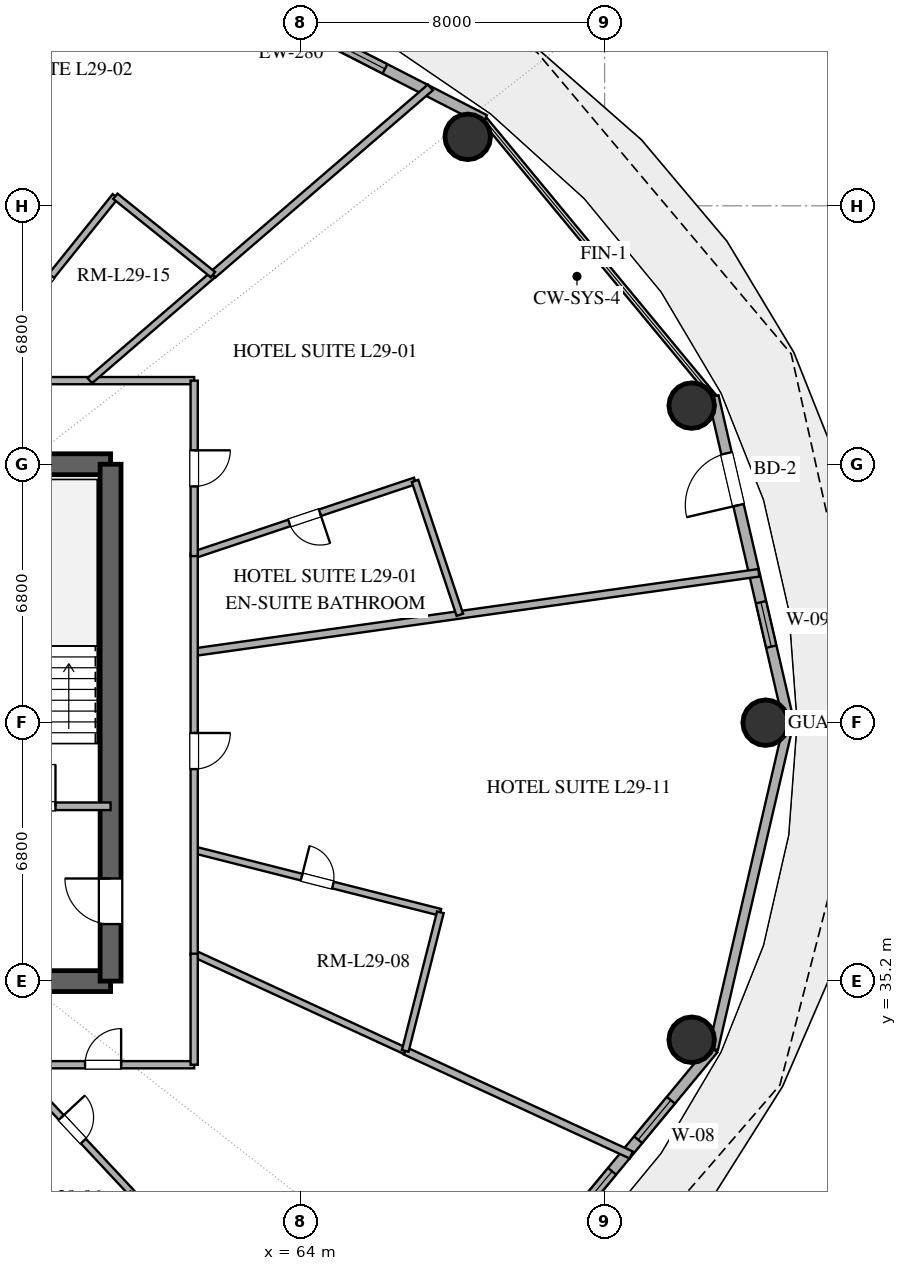
"""IFC4 building model, lengths in metres.
Left out: names, types, materials, properties, quantities, classifications, styles, units other than length and angle.
Written with IfcOpenShell. Run it as: python <this file> out.ifc"""

import sys

from ifc_helpers import new_model, si_unit, direction, frame, frame_2d, origin, origin_2d, place, context, subcontext, project, spatial, rectangle, hollow_circle, extrude, element, fill, save


model = new_model("IFC4")
c1 = context("Model", 3, precision=1e-05, world=origin(), true_north=direction((0.0, 1.0)))
c2 = subcontext(c1, "Body", "Model", "MODEL_VIEW")
j1 = project(units=[si_unit("LENGTHUNIT", "METRE"), si_unit("PLANEANGLEUNIT", "RADIAN")], contexts=[c1])
p1 = place(None, origin())
s1 = spatial("IfcSite", under=j1, at=p1, CompositionType="ELEMENT")
p2 = place(p1, origin())
s2 = spatial("IfcBuilding", under=s1, at=p2, CompositionType="ELEMENT")
p3 = place(p2, frame((0.0, 0.0, 116.4)))
s3 = spatial("IfcBuildingStorey", under=s2, at=p3, CompositionType="ELEMENT", Elevation=116.4)
for number, where, z_axis, x_axis in (
    (1, (55.0, 35.2, 0.0), (0.0, 0.0, 1.0), (1.0, 0.0, 0.0)),
    (2, (55.0, 48.8, 0.0), (0.0, 0.0, 1.0), (1.0, 0.0, 0.0)),
):
    element("IfcWall", number, at=place(p3, frame(where, z_axis=z_axis, x_axis=x_axis)), inside=s3, PredefinedType="SHEAR", context=c2, shape_type="SweptSolid", body=[
        extrude(rectangle(XDim=4.0, YDim=0.55, at=frame_2d((2.0, 0.0))), origin(), (0.0, 0.0, 1.0), 3.38),
    ])
p4 = place(p3, frame((59.0, 35.2, 0.0), z_axis=(0.0, 0.0, 1.0), x_axis=(0.0, 1.0, 0.0)))
e3 = element("IfcWall", 3, at=p4, inside=s3, PredefinedType="SHEAR", context=c2, shape_type="SweptSolid", body=[
    extrude(rectangle(XDim=13.6, YDim=0.55, at=frame_2d((6.8, 0.0))), origin(), (0.0, 0.0, 1.0), 3.38),
])
p5 = place(p4, frame((1.5, 0.0, 0.0)))
e4 = element("IfcOpeningElement", 4, at=p5, cuts=e3, PredefinedType="OPENING", context=c2, shape_type="SweptSolid", body=[
    extrude(rectangle(XDim=1.2, YDim=2.15, at=frame_2d((0.6, 1.075))), frame((0.0, 0.285, 0.0), z_axis=(0.0, -1.0, 0.0), x_axis=(1.0, 0.0, 0.0)), (0.0, 0.0, 1.0), 0.57),
])
for number, where, z_axis, x_axis in (
    (5, (76.237, 42.0, 0.0), (0.0, 0.0, 1.0), (1.0, 0.0, 0.0)),
    (6, (74.291, 50.343, 0.0), (0.0, 0.0, 1.0), (1.0, 0.0, 0.0)),
    (7, (68.398, 57.415, 0.0), (0.0, 0.0, 1.0), (1.0, 0.0, 0.0)),
    (8, (74.291, 33.657, 0.0), (0.0, 0.0, 1.0), (1.0, 0.0, 0.0)),
):
    element("IfcColumn", number, at=place(p3, frame(where, z_axis=z_axis, x_axis=x_axis)), inside=s3, PredefinedType="COLUMN", context=c2, shape_type="SweptSolid", body=[
        extrude(hollow_circle(Radius=0.6, WallThickness=0.032, at=origin_2d()), origin(), (0.0, 0.0, 1.0), 3.38),
    ])
p6 = place(p3, frame((76.849, 42.0, 0.0), z_axis=(0.0, 0.0, 1.0), x_axis=(-0.22558597182, 0.974223264616, 0.0)))
e9 = element("IfcWall", 9, at=p6, inside=s3, PredefinedType="SOLIDWALL", context=c2, shape_type="SweptSolid", body=[
    extrude(rectangle(XDim=8.811, YDim=0.28, at=frame_2d((4.405, 0.0))), origin(), (0.0, 0.0, 1.0), 3.38),
])
p7 = place(p6, frame((2.054, 0.0, 0.85)))
e10 = element("IfcOpeningElement", 10, at=p7, cuts=e9, PredefinedType="OPENING", context=c2, shape_type="SweptSolid", body=[
    extrude(rectangle(XDim=1.2, YDim=1.8, at=frame_2d((0.6, 0.9))), frame((0.0, 0.15, 0.0), z_axis=(0.0, -1.0, 0.0), x_axis=(1.0, 0.0, 0.0)), (0.0, 0.0, 1.0), 0.3),
])
p8 = place(p6, frame((5.875, 0.0, 0.0)))
e11 = element("IfcOpeningElement", 11, at=p8, cuts=e9, PredefinedType="OPENING", context=c2, shape_type="SweptSolid", body=[
    extrude(rectangle(XDim=1.4, YDim=2.2, at=frame_2d((0.7, 1.1))), frame((0.0, 0.15, 0.0), z_axis=(0.0, -1.0, 0.0), x_axis=(1.0, 0.0, 0.0)), (0.0, 0.0, 1.0), 0.3),
])
p9 = place(p3, frame((68.84, 57.86, 0.0), z_axis=(0.0, 0.0, 1.0), x_axis=(-0.889959505023, 0.45603955905, 0.0)))
e12 = element("IfcWall", 12, at=p9, inside=s3, PredefinedType="SOLIDWALL", context=c2, shape_type="SweptSolid", body=[
    extrude(rectangle(XDim=10.662, YDim=0.28, at=frame_2d((5.331, 0.0))), origin(), (0.0, 0.0, 1.0), 3.38),
])
p10 = place(p9, frame((2.942, 0.0, 0.85)))
e13 = element("IfcOpeningElement", 13, at=p10, cuts=e12, PredefinedType="OPENING", context=c2, shape_type="SweptSolid", body=[
    extrude(rectangle(XDim=2.1, YDim=2.2, at=frame_2d((1.05, 1.1))), frame((0.0, 0.15, 0.0), z_axis=(0.0, -1.0, 0.0), x_axis=(1.0, 0.0, 0.0)), (0.0, 0.0, 1.0), 0.3),
])
p11 = place(p9, frame((6.077, 0.0, 0.85)))
e14 = element("IfcOpeningElement", 14, at=p11, cuts=e12, PredefinedType="OPENING", context=c2, shape_type="SweptSolid", body=[
    extrude(rectangle(XDim=2.1, YDim=2.2, at=frame_2d((1.05, 1.1))), frame((0.0, 0.15, 0.0), z_axis=(0.0, -1.0, 0.0), x_axis=(1.0, 0.0, 0.0)), (0.0, 0.0, 1.0), 0.3),
])
p12 = place(p3, frame((68.84, 26.14, 0.0), z_axis=(0.0, 0.0, 1.0), x_axis=(0.637505817448, 0.770445541696, 0.0)))
e15 = element("IfcWall", 15, at=p12, inside=s3, PredefinedType="SOLIDWALL", context=c2, shape_type="SweptSolid", body=[
    extrude(rectangle(XDim=9.445, YDim=0.28, at=frame_2d((4.723, 0.0))), origin(), (0.0, 0.0, 1.0), 3.38),
])
p13 = place(p12, frame((1.863, 0.0, 0.85)))
e16 = element("IfcOpeningElement", 16, at=p13, cuts=e15, PredefinedType="OPENING", context=c2, shape_type="SweptSolid", body=[
    extrude(rectangle(XDim=1.5, YDim=1.8, at=frame_2d((0.75, 0.9))), frame((0.0, 0.15, 0.0), z_axis=(0.0, -1.0, 0.0), x_axis=(1.0, 0.0, 0.0)), (0.0, 0.0, 1.0), 0.3),
])
p14 = place(p12, frame((3.765, 0.0, 0.85)))
e17 = element("IfcOpeningElement", 17, at=p14, cuts=e15, PredefinedType="OPENING", context=c2, shape_type="SweptSolid", body=[
    extrude(rectangle(XDim=1.5, YDim=1.8, at=frame_2d((0.75, 0.9))), frame((0.0, 0.15, 0.0), z_axis=(0.0, -1.0, 0.0), x_axis=(1.0, 0.0, 0.0)), (0.0, 0.0, 1.0), 0.3),
])
p15 = place(p12, frame((6.342, 0.0, 0.85)))
e18 = element("IfcOpeningElement", 18, at=p15, cuts=e15, PredefinedType="OPENING", context=c2, shape_type="SweptSolid", body=[
    extrude(rectangle(XDim=1.35, YDim=1.8, at=frame_2d((0.675, 0.9))), frame((0.0, 0.15, 0.0), z_axis=(0.0, -1.0, 0.0), x_axis=(1.0, 0.0, 0.0)), (0.0, 0.0, 1.0), 0.3),
])
p16 = place(p3, frame((74.861, 33.417, 0.0), z_axis=(0.0, 0.0, 1.0), x_axis=(0.22558597182, 0.974223264616, 0.0)))
e19 = element("IfcWall", 19, at=p16, inside=s3, PredefinedType="SOLIDWALL", context=c2, shape_type="SweptSolid", body=[
    extrude(rectangle(XDim=8.811, YDim=0.25, at=frame_2d((4.405, 0.0))), origin(), (0.0, 0.0, 1.0), 3.38),
])
p17 = place(p3, frame((55.0, 39.8, 0.0), z_axis=(0.0, 0.0, 1.0), x_axis=(1.0, 0.0, 0.0)))
e20 = element("IfcWall", 20, at=p17, inside=s3, PredefinedType="SOLIDWALL", context=c2, shape_type="SweptSolid", body=[
    extrude(rectangle(XDim=4.0, YDim=0.2, at=frame_2d((2.0, 0.0))), origin(), (0.0, 0.0, 1.0), 2.74),
])
p18 = place(p17, frame((1.45, 0.0, 0.0)))
e21 = element("IfcOpeningElement", 21, at=p18, cuts=e20, PredefinedType="OPENING", context=c2, shape_type="SweptSolid", body=[
    extrude(rectangle(XDim=1.1, YDim=2.15, at=frame_2d((0.55, 1.075))), frame((0.0, 0.11, 0.0), z_axis=(0.0, -1.0, 0.0), x_axis=(1.0, 0.0, 0.0)), (0.0, 0.0, 1.0), 0.22),
])
p19 = place(p3, frame((61.2, 43.855, 0.0), z_axis=(0.0, 0.0, 1.0), x_axis=(0.990266848234, 0.139181785048, 0.0)))
e22 = element("IfcWall", 22, at=p19, inside=s3, PredefinedType="PARTITIONING", context=c2, shape_type="SweptSolid", body=[
    extrude(rectangle(XDim=15.005, YDim=0.2, at=frame_2d((7.502, 0.0))), origin(), (0.0, 0.0, 1.0), 2.74),
])
p20 = place(p3, frame((67.415, 58.716, 0.0), z_axis=(0.0, 0.0, 1.0), x_axis=(-0.757805222449, -0.652480838668, 0.0)))
e23 = element("IfcWall", 23, at=p20, inside=s3, PredefinedType="PARTITIONING", context=c2, shape_type="SweptSolid", body=[
    extrude(rectangle(XDim=7.55, YDim=0.2, at=frame_2d((3.775, 0.0))), origin(), (0.0, 0.0, 1.0), 2.74),
])
p21 = place(p3, frame((61.2, 38.653, 0.0), z_axis=(0.0, 0.0, 1.0), x_axis=(0.96932048276, -0.24580032893, 0.0)))
e24 = element("IfcWall", 24, at=p21, inside=s3, PredefinedType="PLUMBINGWALL", context=c2, shape_type="SweptSolid", body=[
    extrude(rectangle(XDim=6.684, YDim=0.18, at=frame_2d((3.342, 0.0))), origin(), (0.0, 0.0, 1.0), 2.74),
])
p22 = place(p21, frame((2.917, 0.0, 0.0)))
e25 = element("IfcOpeningElement", 25, at=p22, cuts=e24, PredefinedType="OPENING", context=c2, shape_type="SweptSolid", body=[
    extrude(rectangle(XDim=0.85, YDim=2.1, at=frame_2d((0.425, 1.05))), frame((0.0, 0.1, 0.0), z_axis=(0.0, -1.0, 0.0), x_axis=(1.0, 0.0, 0.0)), (0.0, 0.0, 1.0), 0.2),
])
p23 = place(p3, frame((72.701, 30.624, 0.0), z_axis=(0.0, 0.0, 1.0), x_axis=(-0.9083071886, 0.418303778536, 0.0)))
e26 = element("IfcWall", 26, at=p23, inside=s3, PredefinedType="PARTITIONING", context=c2, shape_type="SweptSolid", body=[
    extrude(rectangle(XDim=6.548, YDim=0.2, at=frame_2d((3.274, 0.0))), origin(), (0.0, 0.0, 1.0), 2.74),
])
p24 = place(p3, frame((55.229, 51.0, 0.0), z_axis=(0.0, 0.0, 1.0), x_axis=(0.626239129839, 0.779631035977, 0.0)))
e27 = element("IfcWall", 27, at=p24, inside=s3, PredefinedType="PLUMBINGWALL", context=c2, shape_type="SweptSolid", body=[
    extrude(rectangle(XDim=6.223, YDim=0.18, at=frame_2d((3.112, 0.0))), origin(), (0.0, 0.0, 1.0), 2.74),
])
p25 = place(p24, frame((2.687, 0.0, 0.0)))
e28 = element("IfcOpeningElement", 28, at=p25, cuts=e27, PredefinedType="OPENING", context=c2, shape_type="SweptSolid", body=[
    extrude(rectangle(XDim=0.85, YDim=2.1, at=frame_2d((0.425, 1.05))), frame((0.0, 0.1, 0.0), z_axis=(0.0, -1.0, 0.0), x_axis=(1.0, 0.0, 0.0)), (0.0, 0.0, 1.0), 0.2),
])
p26 = place(p3, frame((67.012, 48.361, 0.0), z_axis=(0.0, 0.0, 1.0), x_axis=(-0.948332174456, -0.317279193915, 0.0)))
e29 = element("IfcWall", 29, at=p26, inside=s3, PredefinedType="PLUMBINGWALL", context=c2, shape_type="SweptSolid", body=[
    extrude(rectangle(XDim=6.129, YDim=0.18, at=frame_2d((3.064, 0.0))), origin(), (0.0, 0.0, 1.0), 2.74),
])
p27 = place(p26, frame((2.639, 0.0, 0.0)))
e30 = element("IfcOpeningElement", 30, at=p27, cuts=e29, PredefinedType="OPENING", context=c2, shape_type="SweptSolid", body=[
    extrude(rectangle(XDim=0.85, YDim=2.1, at=frame_2d((0.425, 1.05))), frame((0.0, 0.1, 0.0), z_axis=(0.0, -1.0, 0.0), x_axis=(1.0, 0.0, 0.0)), (0.0, 0.0, 1.0), 0.2),
])
p28 = place(p3, frame((66.754, 33.363, 0.0), z_axis=(0.0, 0.0, 1.0), x_axis=(-0.908301480607, 0.418316172681, 0.0)))
e31 = element("IfcWall", 31, at=p28, inside=s3, PredefinedType="PLUMBINGWALL", context=c2, shape_type="SweptSolid", body=[
    extrude(rectangle(XDim=6.115, YDim=0.18, at=frame_2d((3.057, 0.0))), origin(), (0.0, 0.0, 1.0), 2.74),
])
p29 = place(p3, frame((45.355, 51.0, 0.0), z_axis=(0.0, 0.0, 1.0), x_axis=(1.0, 0.0, 0.0)))
e32 = element("IfcWall", 32, at=p29, inside=s3, PredefinedType="PARTITIONING", context=c2, shape_type="SweptSolid", body=[
    extrude(rectangle(XDim=15.845, YDim=0.19, at=frame_2d((7.922, 0.0))), origin(), (0.0, 0.0, 1.0), 2.74),
])
p30 = place(p29, frame((2.176, 0.0, 0.0)))
e33 = element("IfcOpeningElement", 33, at=p30, cuts=e32, PredefinedType="OPENING", context=c2, shape_type="SweptSolid", body=[
    extrude(rectangle(XDim=1.0, YDim=2.2, at=frame_2d((0.5, 1.1))), frame((0.0, 0.105, 0.0), z_axis=(0.0, -1.0, 0.0), x_axis=(1.0, 0.0, 0.0)), (0.0, 0.0, 1.0), 0.21),
])
p31 = place(p29, frame((7.125, 0.0, 0.0)))
e34 = element("IfcOpeningElement", 34, at=p31, cuts=e32, PredefinedType="OPENING", context=c2, shape_type="SweptSolid", body=[
    extrude(rectangle(XDim=0.95, YDim=2.15, at=frame_2d((0.475, 1.075))), frame((0.0, 0.105, 0.0), z_axis=(0.0, -1.0, 0.0), x_axis=(1.0, 0.0, 0.0)), (0.0, 0.0, 1.0), 0.21),
])
p32 = place(p3, frame((61.2, 46.45, 0.0), z_axis=(0.0, 0.0, 1.0), x_axis=(0.0, -1.0, 0.0)))
e35 = element("IfcWall", 35, at=p32, inside=s3, PredefinedType="PARTITIONING", context=c2, shape_type="SweptSolid", body=[
    extrude(rectangle(XDim=10.564, YDim=0.19, at=frame_2d((5.282, 0.0))), origin(), (0.0, 0.0, 1.0), 2.74),
])
p33 = place(p32, frame((4.722, 0.0, 0.0)))
e36 = element("IfcOpeningElement", 36, at=p33, cuts=e35, PredefinedType="OPENING", context=c2, shape_type="SweptSolid", body=[
    extrude(rectangle(XDim=0.95, YDim=2.15, at=frame_2d((0.475, 1.075))), frame((0.0, 0.105, 0.0), z_axis=(0.0, -1.0, 0.0), x_axis=(1.0, 0.0, 0.0)), (0.0, 0.0, 1.0), 0.21),
])
p34 = place(p3, frame((53.706, 33.0, 0.0), z_axis=(0.0, 0.0, 1.0), x_axis=(1.0, 0.0, 0.0)))
e37 = element("IfcWall", 37, at=p34, inside=s3, PredefinedType="PARTITIONING", context=c2, shape_type="SweptSolid", body=[
    extrude(rectangle(XDim=7.494, YDim=0.19, at=frame_2d((3.747, 0.0))), origin(), (0.0, 0.0, 1.0), 2.74),
])
p35 = place(p34, frame((4.622, 0.0, 0.0)))
e38 = element("IfcOpeningElement", 38, at=p35, cuts=e37, PredefinedType="OPENING", context=c2, shape_type="SweptSolid", body=[
    extrude(rectangle(XDim=0.95, YDim=2.15, at=frame_2d((0.475, 1.075))), frame((0.0, 0.105, 0.0), z_axis=(0.0, -1.0, 0.0), x_axis=(1.0, 0.0, 0.0)), (0.0, 0.0, 1.0), 0.21),
])
p36 = place(p3, frame((56.406, 33.0, 0.0), z_axis=(0.0, 0.0, 1.0), x_axis=(0.682578142961, -0.730812615348, 0.0)))
e39 = element("IfcWall", 39, at=p36, inside=s3, PredefinedType="PLUMBINGWALL", context=c2, shape_type="SweptSolid", body=[
    extrude(rectangle(XDim=4.652, YDim=0.18, at=frame_2d((2.326, 0.0))), origin(), (0.0, 0.0, 1.0), 2.74),
])
p37 = place(p36, frame((1.901, 0.0, 0.0)))
e40 = element("IfcOpeningElement", 40, at=p37, cuts=e39, PredefinedType="OPENING", context=c2, shape_type="SweptSolid", body=[
    extrude(rectangle(XDim=0.85, YDim=2.1, at=frame_2d((0.425, 1.05))), frame((0.0, 0.1, 0.0), z_axis=(0.0, -1.0, 0.0), x_axis=(1.0, 0.0, 0.0)), (0.0, 0.0, 1.0), 0.2),
])
p38 = place(p3, frame((61.2, 51.0, 0.0), z_axis=(0.0, 0.0, 1.0), x_axis=(0.0, -1.0, 0.0)))
e41 = element("IfcWall", 41, at=p38, inside=s3, PredefinedType="PARTITIONING", context=c2, shape_type="SweptSolid", body=[
    extrude(rectangle(XDim=4.617, YDim=0.19, at=frame_2d((2.309, 0.0))), origin(), (0.0, 0.0, 1.0), 2.74),
])
p39 = place(p38, frame((1.833, 0.0, 0.0)))
e42 = element("IfcOpeningElement", 42, at=p39, cuts=e41, PredefinedType="OPENING", context=c2, shape_type="SweptSolid", body=[
    extrude(rectangle(XDim=0.95, YDim=2.15, at=frame_2d((0.475, 1.075))), frame((0.0, 0.105, 0.0), z_axis=(0.0, -1.0, 0.0), x_axis=(1.0, 0.0, 0.0)), (0.0, 0.0, 1.0), 0.21),
])
p40 = place(p3, frame((61.694, 53.79, 0.0), z_axis=(0.0, 0.0, 1.0), x_axis=(-0.757844088621, -0.652435695945, 0.0)))
e43 = element("IfcWall", 43, at=p40, inside=s3, PredefinedType="PLUMBINGWALL", context=c2, shape_type="SweptSolid", body=[
    extrude(rectangle(XDim=4.276, YDim=0.18, at=frame_2d((2.138, 0.0))), origin(), (0.0, 0.0, 1.0), 2.74),
])
p41 = place(p3, frame((67.678, 37.01, 0.0), z_axis=(0.0, 0.0, 1.0), x_axis=(-0.245725202551, -0.969339530212, 0.0)))
e44 = element("IfcWall", 44, at=p41, inside=s3, PredefinedType="PLUMBINGWALL", context=c2, shape_type="SweptSolid", body=[
    extrude(rectangle(XDim=3.763, YDim=0.18, at=frame_2d((1.881, 0.0))), origin(), (0.0, 0.0, 1.0), 2.74),
])
p42 = place(p3, frame((68.191, 44.838, 0.0), z_axis=(0.0, 0.0, 1.0), x_axis=(-0.317291996527, 0.948327891048, 0.0)))
e45 = element("IfcWall", 45, at=p42, inside=s3, PredefinedType="PLUMBINGWALL", context=c2, shape_type="SweptSolid", body=[
    extrude(rectangle(XDim=3.716, YDim=0.18, at=frame_2d((1.858, 0.0))), origin(), (0.0, 0.0, 1.0), 2.74),
])
p43 = place(p3, frame((59.126, 55.852, 0.0), z_axis=(0.0, 0.0, 1.0), x_axis=(0.779630447666, -0.626239862251, 0.0)))
e46 = element("IfcWall", 46, at=p43, inside=s3, PredefinedType="PLUMBINGWALL", context=c2, shape_type="SweptSolid", body=[
    extrude(rectangle(XDim=3.293, YDim=0.18, at=frame_2d((1.646, 0.0))), origin(), (0.0, 0.0, 1.0), 2.74),
])
p44 = place(p3, frame((61.2, 33.0, 0.0), z_axis=(0.0, 0.0, 1.0), x_axis=(0.0, 1.0, 0.0)))
e47 = element("IfcWall", 47, at=p44, inside=s3, PredefinedType="PARTITIONING", context=c2, shape_type="SweptSolid", body=[
    extrude(rectangle(XDim=2.921, YDim=0.19, at=frame_2d((1.46, 0.0))), origin(), (0.0, 0.0, 1.0), 2.74),
])
p45 = place(p7, origin())
e48 = element("IfcWindow", 48, at=p45, inside=s3, PartitioningType="SINGLE_PANEL", PredefinedType="WINDOW", context=c2, shape_type="SweptSolid", body=[
    extrude(rectangle(XDim=1.2, YDim=1.8, at=frame_2d((0.6, 0.9))), frame((0.0, 0.03, 0.0), z_axis=(0.0, -1.0, 0.0), x_axis=(1.0, 0.0, 0.0)), (0.0, 0.0, 1.0), 0.06),
])
fill(e10, e48)
p46 = place(p8, origin())
e49 = element("IfcDoor", 49, at=p46, inside=s3, OperationType="SINGLE_SWING_LEFT", PredefinedType="DOOR", context=c2, shape_type="SweptSolid", body=[
    extrude(rectangle(XDim=1.4, YDim=2.2, at=frame_2d((0.7, 1.1))), frame((0.0, 0.025, 0.0), z_axis=(0.0, -1.0, 0.0), x_axis=(1.0, 0.0, 0.0)), (0.0, 0.0, 1.0), 0.05),
])
fill(e11, e49)
p47 = place(p10, origin())
e50 = element("IfcWindow", 50, at=p47, inside=s3, PartitioningType="SINGLE_PANEL", PredefinedType="WINDOW", context=c2, shape_type="SweptSolid", body=[
    extrude(rectangle(XDim=2.1, YDim=2.2, at=frame_2d((1.05, 1.1))), frame((0.0, 0.03, 0.0), z_axis=(0.0, -1.0, 0.0), x_axis=(1.0, 0.0, 0.0)), (0.0, 0.0, 1.0), 0.06),
])
fill(e13, e50)
p48 = place(p14, origin())
e51 = element("IfcWindow", 51, at=p48, inside=s3, PartitioningType="SINGLE_PANEL", PredefinedType="WINDOW", context=c2, shape_type="SweptSolid", body=[
    extrude(rectangle(XDim=1.5, YDim=1.8, at=frame_2d((0.75, 0.9))), frame((0.0, 0.03, 0.0), z_axis=(0.0, -1.0, 0.0), x_axis=(1.0, 0.0, 0.0)), (0.0, 0.0, 1.0), 0.06),
])
fill(e17, e51)
p49 = place(p15, origin())
e52 = element("IfcWindow", 52, at=p49, inside=s3, PartitioningType="SINGLE_PANEL", PredefinedType="WINDOW", context=c2, shape_type="SweptSolid", body=[
    extrude(rectangle(XDim=1.35, YDim=1.8, at=frame_2d((0.675, 0.9))), frame((0.0, 0.03, 0.0), z_axis=(0.0, -1.0, 0.0), x_axis=(1.0, 0.0, 0.0)), (0.0, 0.0, 1.0), 0.06),
])
fill(e18, e52)
p50 = place(p5, origin())
e53 = element("IfcDoor", 53, at=p50, inside=s3, OperationType="SINGLE_SWING_RIGHT", PredefinedType="DOOR", context=c2, shape_type="SweptSolid", body=[
    extrude(rectangle(XDim=1.2, YDim=2.15, at=frame_2d((0.6, 1.075))), frame((0.0, 0.025, 0.0), z_axis=(0.0, -1.0, 0.0), x_axis=(1.0, 0.0, 0.0)), (0.0, 0.0, 1.0), 0.05),
])
fill(e4, e53)
p51 = place(p18, origin())
e54 = element("IfcDoor", 54, at=p51, inside=s3, OperationType="SINGLE_SWING_RIGHT", PredefinedType="DOOR", context=c2, shape_type="SweptSolid", body=[
    extrude(rectangle(XDim=1.1, YDim=2.15, at=frame_2d((0.55, 1.075))), frame((0.0, 0.025, 0.0), z_axis=(0.0, -1.0, 0.0), x_axis=(1.0, 0.0, 0.0)), (0.0, 0.0, 1.0), 0.05),
])
fill(e21, e54)
p52 = place(p22, origin())
e55 = element("IfcDoor", 55, at=p52, inside=s3, OperationType="SINGLE_SWING_LEFT", PredefinedType="DOOR", context=c2, shape_type="SweptSolid", body=[
    extrude(rectangle(XDim=0.85, YDim=2.1, at=frame_2d((0.425, 1.05))), frame((0.0, 0.025, 0.0), z_axis=(0.0, -1.0, 0.0), x_axis=(1.0, 0.0, 0.0)), (0.0, 0.0, 1.0), 0.05),
])
fill(e25, e55)
p53 = place(p25, origin())
e56 = element("IfcDoor", 56, at=p53, inside=s3, OperationType="SINGLE_SWING_LEFT", PredefinedType="DOOR", context=c2, shape_type="SweptSolid", body=[
    extrude(rectangle(XDim=0.85, YDim=2.1, at=frame_2d((0.425, 1.05))), frame((0.0, 0.025, 0.0), z_axis=(0.0, -1.0, 0.0), x_axis=(1.0, 0.0, 0.0)), (0.0, 0.0, 1.0), 0.05),
])
fill(e28, e56)
p54 = place(p27, origin())
e57 = element("IfcDoor", 57, at=p54, inside=s3, OperationType="SINGLE_SWING_LEFT", PredefinedType="DOOR", context=c2, shape_type="SweptSolid", body=[
    extrude(rectangle(XDim=0.85, YDim=2.1, at=frame_2d((0.425, 1.05))), frame((0.0, 0.025, 0.0), z_axis=(0.0, -1.0, 0.0), x_axis=(1.0, 0.0, 0.0)), (0.0, 0.0, 1.0), 0.05),
])
fill(e30, e57)
p55 = place(p33, origin())
e58 = element("IfcDoor", 58, at=p55, inside=s3, OperationType="SINGLE_SWING_LEFT", PredefinedType="DOOR", context=c2, shape_type="SweptSolid", body=[
    extrude(rectangle(XDim=0.95, YDim=2.15, at=frame_2d((0.475, 1.075))), frame((0.0, 0.025, 0.0), z_axis=(0.0, -1.0, 0.0), x_axis=(1.0, 0.0, 0.0)), (0.0, 0.0, 1.0), 0.05),
])
fill(e36, e58)
p56 = place(p35, origin())
e59 = element("IfcDoor", 59, at=p56, inside=s3, OperationType="SINGLE_SWING_RIGHT", PredefinedType="DOOR", context=c2, shape_type="SweptSolid", body=[
    extrude(rectangle(XDim=0.95, YDim=2.15, at=frame_2d((0.475, 1.075))), frame((0.0, 0.025, 0.0), z_axis=(0.0, -1.0, 0.0), x_axis=(1.0, 0.0, 0.0)), (0.0, 0.0, 1.0), 0.05),
])
fill(e38, e59)
p57 = place(p37, origin())
e60 = element("IfcDoor", 60, at=p57, inside=s3, OperationType="SINGLE_SWING_LEFT", PredefinedType="DOOR", context=c2, shape_type="SweptSolid", body=[
    extrude(rectangle(XDim=0.85, YDim=2.1, at=frame_2d((0.425, 1.05))), frame((0.0, 0.025, 0.0), z_axis=(0.0, -1.0, 0.0), x_axis=(1.0, 0.0, 0.0)), (0.0, 0.0, 1.0), 0.05),
])
fill(e40, e60)
p58 = place(p39, origin())
e61 = element("IfcDoor", 61, at=p58, inside=s3, OperationType="SINGLE_SWING_LEFT", PredefinedType="DOOR", context=c2, shape_type="SweptSolid", body=[
    extrude(rectangle(XDim=0.95, YDim=2.15, at=frame_2d((0.475, 1.075))), frame((0.0, 0.025, 0.0), z_axis=(0.0, -1.0, 0.0), x_axis=(1.0, 0.0, 0.0)), (0.0, 0.0, 1.0), 0.05),
])
fill(e42, e61)
save(model, sys.argv[1])
